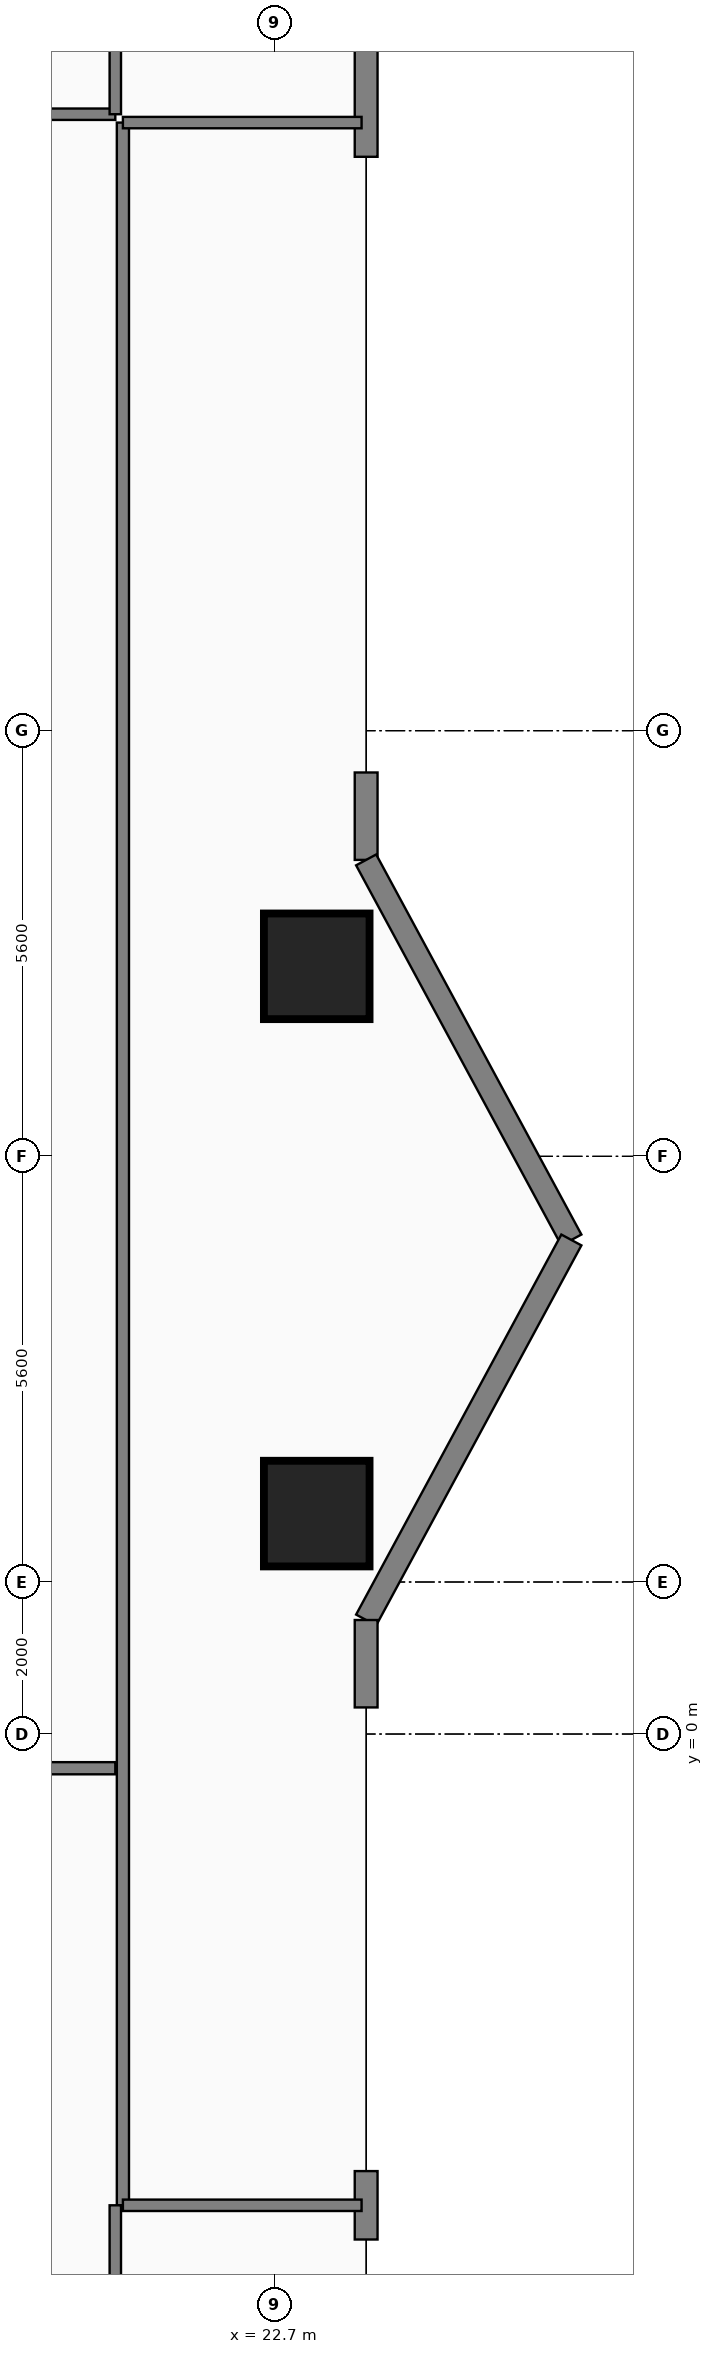
"""IFC4 building model, lengths in metres.
Left out: names, types, materials, properties, quantities, classifications, styles, units other than length and angle.
Written with IfcOpenShell. Run it as: python <this file> out.ifc"""

import sys

from ifc_helpers import new_model, si_unit, direction, frame, frame_2d, origin, origin_2d, place, context, subcontext, project, spatial, rectangle, extrude, element, fill, save


model = new_model("IFC4")
c1 = context("Model", 3, precision=1e-05, world=origin(), true_north=direction((0.0, 1.0)))
c2 = subcontext(c1, "Body", "Model", "MODEL_VIEW")
j1 = project(units=[si_unit("LENGTHUNIT", "METRE"), si_unit("PLANEANGLEUNIT", "RADIAN")], contexts=[c1])
p1 = place(None, origin())
s1 = spatial("IfcSite", under=j1, at=p1, CompositionType="ELEMENT")
p2 = place(p1, origin())
s2 = spatial("IfcBuilding", under=s1, at=p2, CompositionType="ELEMENT")
p3 = place(p2, frame((0.0, 0.0, 154.05)))
s3 = spatial("IfcBuildingStorey", under=s2, at=p3, CompositionType="ELEMENT", Elevation=154.05)
for number, where, z_axis, x_axis in (
    (1, (23.25, 2.9, 0.0), (0.0, 0.0, 1.0), (1.0, 0.0, 0.0)),
    (2, (23.25, 10.1, 0.0), (0.0, 0.0, 1.0), (1.0, 0.0, 0.0)),
):
    element("IfcColumn", number, at=place(p3, frame(where, z_axis=z_axis, x_axis=x_axis)), inside=s3, PredefinedType="COLUMN", context=c2, shape_type="SweptSolid", body=[
        extrude(rectangle(XDim=1.35, YDim=1.35, at=origin_2d()), origin(), (0.0, 0.0, 1.0), 4.5),
    ])
p4 = place(p3, frame((23.9, 24.9, 0.0), z_axis=(0.0, 0.0, 1.0), x_axis=(0.0, -1.0, 0.0)))
e3 = element("IfcWall", 3, at=p4, inside=s3, PredefinedType="STANDARD", context=c2, shape_type="SweptSolid", body=[
    extrude(rectangle(XDim=4.15, YDim=0.3, at=frame_2d((2.075, 0.0))), origin(), (0.0, 0.0, 1.0), 4.28),
])
p5 = place(p4, frame((1.11, 0.0, 0.85)))
e4 = element("IfcOpeningElement", 4, at=p5, cuts=e3, PredefinedType="OPENING", context=c2, shape_type="SweptSolid", body=[
    extrude(rectangle(XDim=1.6, YDim=1.8, at=frame_2d((0.8, 0.9))), frame((0.0, 0.16, 0.0), z_axis=(0.0, -1.0, 0.0), x_axis=(1.0, 0.0, 0.0)), (0.0, 0.0, 1.0), 0.32),
])
p6 = place(p3, frame((23.9, 12.65, 0.0), z_axis=(0.0, 0.0, 1.0), x_axis=(0.0, -1.0, 0.0)))
e5 = element("IfcWall", 5, at=p6, inside=s3, PredefinedType="STANDARD", context=c2, shape_type="SweptSolid", body=[
    extrude(rectangle(XDim=1.15, YDim=0.3, at=frame_2d((0.575, 0.0))), origin(), (0.0, 0.0, 1.0), 4.28),
])
for number, where, z_axis, x_axis in (
    (6, (23.9, 11.5, 0.0), (0.0, 0.0, 1.0), (0.475, -0.88, 0.0)),
    (7, (26.6, 6.5, 0.0), (0.0, 0.0, 1.0), (-0.475, -0.88, 0.0)),
):
    element("IfcWall", number, at=place(p3, frame(where, z_axis=z_axis, x_axis=x_axis)), inside=s3, PredefinedType="STANDARD", context=c2, shape_type="SweptSolid", body=[
        extrude(rectangle(XDim=5.683, YDim=0.3, at=frame_2d((2.841, 0.0))), origin(), (0.0, 0.0, 1.0), 4.28),
    ])
p7 = place(p3, frame((23.9, 1.5, 0.0), z_axis=(0.0, 0.0, 1.0), x_axis=(0.0, -1.0, 0.0)))
e8 = element("IfcWall", 8, at=p7, inside=s3, PredefinedType="STANDARD", context=c2, shape_type="SweptSolid", body=[
    extrude(rectangle(XDim=1.15, YDim=0.3, at=frame_2d((0.575, 0.0))), origin(), (0.0, 0.0, 1.0), 4.28),
])
p8 = place(p3, frame((23.9, -5.75, 0.0), z_axis=(0.0, 0.0, 1.0), x_axis=(0.0, -1.0, 0.0)))
e9 = element("IfcWall", 9, at=p8, inside=s3, PredefinedType="STANDARD", context=c2, shape_type="SweptSolid", body=[
    extrude(rectangle(XDim=0.9, YDim=0.3, at=frame_2d((0.45, 0.0))), origin(), (0.0, 0.0, 1.0), 4.28),
])
p9 = place(p3, frame((20.7, -6.2, 0.0), z_axis=(0.0, 0.0, 1.0), x_axis=(0.0, 1.0, 0.0)))
e10 = element("IfcWall", 10, at=p9, inside=s3, PredefinedType="PARTITIONING", context=c2, shape_type="SweptSolid", body=[
    extrude(rectangle(XDim=27.4, YDim=0.16, at=frame_2d((13.7, 0.0))), origin(), (0.0, 0.0, 1.0), 4.28),
])
p10 = place(p9, frame((13.16, 0.0, 0.0)))
e11 = element("IfcOpeningElement", 11, at=p10, cuts=e10, PredefinedType="OPENING", context=c2, shape_type="SweptSolid", body=[
    extrude(rectangle(XDim=1.08, YDim=2.18, at=frame_2d((0.54, 1.09))), frame((0.0, 0.09, 0.0), z_axis=(0.0, -1.0, 0.0), x_axis=(1.0, 0.0, 0.0)), (0.0, 0.0, 1.0), 0.18),
])
p11 = place(p3, frame((11.4, -0.45, 0.0), z_axis=(0.0, 0.0, 1.0), x_axis=(1.0, 0.0, 0.0)))
e12 = element("IfcWall", 12, at=p11, inside=s3, PredefinedType="PARTITIONING", context=c2, shape_type="SweptSolid", body=[
    extrude(rectangle(XDim=9.2, YDim=0.16, at=frame_2d((4.6, 0.0))), origin(), (0.0, 0.0, 1.0), 4.28),
])
p12 = place(p11, frame((4.06, 0.0, 0.0)))
e13 = element("IfcOpeningElement", 13, at=p12, cuts=e12, PredefinedType="OPENING", context=c2, shape_type="SweptSolid", body=[
    extrude(rectangle(XDim=1.08, YDim=2.18, at=frame_2d((0.54, 1.09))), frame((0.0, 0.09, 0.0), z_axis=(0.0, -1.0, 0.0), x_axis=(1.0, 0.0, 0.0)), (0.0, 0.0, 1.0), 0.18),
])
for number, where, z_axis, x_axis in (
    (14, (20.7, -6.2, 0.0), (0.0, 0.0, 1.0), (1.0, 0.0, 0.0)),
    (15, (20.7, 21.2, 0.0), (0.0, 0.0, 1.0), (1.0, 0.0, 0.0)),
):
    element("IfcWall", number, at=place(p3, frame(where, z_axis=z_axis, x_axis=x_axis)), inside=s3, PredefinedType="PARTITIONING", context=c2, shape_type="SweptSolid", body=[
        extrude(rectangle(XDim=3.14, YDim=0.15, at=frame_2d((1.57, 0.0))), origin(), (0.0, 0.0, 1.0), 4.28),
    ])
p13 = place(p3, frame((20.6, -11.84, 0.0), z_axis=(0.0, 0.0, 1.0), x_axis=(0.0, 1.0, 0.0)))
e16 = element("IfcWall", 16, at=p13, inside=s3, PredefinedType="PARTITIONING", context=c2, shape_type="SweptSolid", body=[
    extrude(rectangle(XDim=5.64, YDim=0.15, at=frame_2d((2.82, 0.0))), origin(), (0.0, 0.0, 1.0), 4.28),
])
p14 = place(p3, frame((16.2, 21.31, 0.0), z_axis=(0.0, 0.0, 1.0), x_axis=(1.0, 0.0, 0.0)))
e17 = element("IfcWall", 17, at=p14, inside=s3, PredefinedType="PARTITIONING", context=c2, shape_type="SweptSolid", body=[
    extrude(rectangle(XDim=4.4, YDim=0.15, at=frame_2d((2.2, 0.0))), origin(), (0.0, 0.0, 1.0), 4.28),
])
p15 = place(p3, frame((20.6, 21.31, 0.0), z_axis=(0.0, 0.0, 1.0), x_axis=(0.0, 1.0, 0.0)))
e18 = element("IfcWall", 18, at=p15, inside=s3, PredefinedType="PARTITIONING", context=c2, shape_type="SweptSolid", body=[
    extrude(rectangle(XDim=3.53, YDim=0.15, at=frame_2d((1.765, 0.0))), origin(), (0.0, 0.0, 1.0), 4.28),
])
p16 = place(p10, origin())
e19 = element("IfcDoor", 19, at=p16, inside=s3, OperationType="SINGLE_SWING_LEFT", PredefinedType="DOOR", context=c2, shape_type="SweptSolid", body=[
    extrude(rectangle(XDim=1.08, YDim=2.18, at=frame_2d((0.54, 1.09))), frame((0.0, 0.025, 0.0), z_axis=(0.0, -1.0, 0.0), x_axis=(1.0, 0.0, 0.0)), (0.0, 0.0, 1.0), 0.05),
])
fill(e11, e19)
save(model, sys.argv[1])
